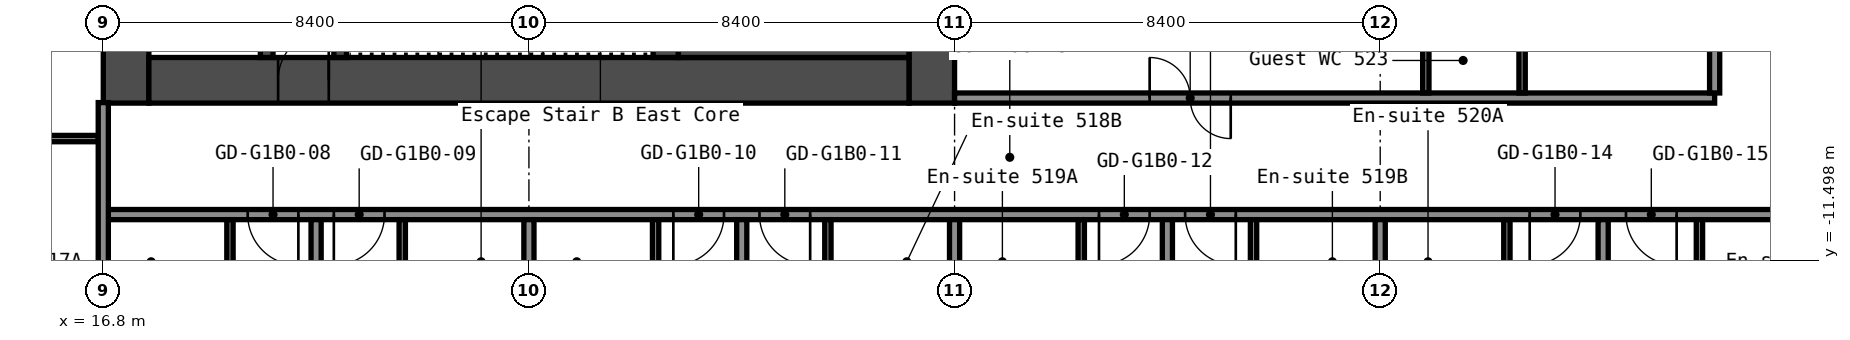
"""IFC4 building model, lengths in metres.
Left out: names, types, materials, properties, quantities, classifications, styles, units other than length and angle.
Written with IfcOpenShell. Run it as: python <this file> out.ifc"""

import sys

from ifc_helpers import new_model, si_unit, direction, frame, frame_2d, origin, place, context, subcontext, project, spatial, rectangle, extrude, element, fill, save


model = new_model("IFC4")
c1 = context("Model", 3, precision=1e-05, world=origin(), true_north=direction((0.0, 1.0)))
c2 = subcontext(c1, "Body", "Model", "MODEL_VIEW")
j1 = project(units=[si_unit("LENGTHUNIT", "METRE"), si_unit("PLANEANGLEUNIT", "RADIAN")], contexts=[c1])
p1 = place(None, origin())
s1 = spatial("IfcSite", under=j1, at=p1, CompositionType="ELEMENT")
p2 = place(p1, origin())
s2 = spatial("IfcBuilding", under=s1, at=p2, CompositionType="ELEMENT")
p3 = place(p2, frame((0.0, 0.0, 23.0)))
s3 = spatial("IfcBuildingStorey", under=s2, at=p3, CompositionType="ELEMENT", Elevation=23.0)
p4 = place(p3, frame((17.25, -8.4, 0.0), z_axis=(0.0, 0.0, 1.0), x_axis=(0.0, 1.0, 0.0)))
e1 = element("IfcWall", 1, at=p4, inside=s3, PredefinedType="SHEAR", context=c2, shape_type="SweptSolid", body=[
    extrude(rectangle(XDim=16.8, YDim=0.9, at=frame_2d((8.4, 0.0))), origin(), (0.0, 0.0, 1.0), 2.8),
])
p5 = place(p4, frame((12.75, 0.0, 0.0)))
e2 = element("IfcOpeningElement", 2, at=p5, cuts=e1, PredefinedType="OPENING", context=c2, shape_type="SweptSolid", body=[
    extrude(rectangle(XDim=1.2, YDim=2.1, at=frame_2d((0.6, 1.05))), frame((0.0, 0.46, 0.0), z_axis=(0.0, -1.0, 0.0), x_axis=(1.0, 0.0, 0.0)), (0.0, 0.0, 1.0), 0.92),
])
p6 = place(p4, frame((2.85, 0.0, 0.0)))
e3 = element("IfcOpeningElement", 3, at=p6, cuts=e1, PredefinedType="OPENING", context=c2, shape_type="SweptSolid", body=[
    extrude(rectangle(XDim=1.2, YDim=2.1, at=frame_2d((0.6, 1.05))), frame((0.0, 0.46, 0.0), z_axis=(0.0, -1.0, 0.0), x_axis=(1.0, 0.0, 0.0)), (0.0, 0.0, 1.0), 0.92),
])
p7 = place(p3, frame((33.15, -8.4, 0.0), z_axis=(0.0, 0.0, 1.0), x_axis=(0.0, 1.0, 0.0)))
e4 = element("IfcWall", 4, at=p7, inside=s3, PredefinedType="SHEAR", context=c2, shape_type="SweptSolid", body=[
    extrude(rectangle(XDim=16.8, YDim=0.9, at=frame_2d((8.4, 0.0))), origin(), (0.0, 0.0, 1.0), 2.8),
])
p8 = place(p3, frame((17.7, -7.95, 0.0), z_axis=(0.0, 0.0, 1.0), x_axis=(1.0, 0.0, 0.0)))
e5 = element("IfcWall", 5, at=p8, inside=s3, PredefinedType="SHEAR", context=c2, shape_type="SweptSolid", body=[
    extrude(rectangle(XDim=15.0, YDim=0.9, at=frame_2d((7.5, 0.0))), origin(), (0.0, 0.0, 1.0), 2.8),
])
p9 = place(p8, frame((2.55, 0.0, 0.0)))
e6 = element("IfcOpeningElement", 6, at=p9, cuts=e5, PredefinedType="OPENING", context=c2, shape_type="SweptSolid", body=[
    extrude(rectangle(XDim=1.0, YDim=2.1, at=frame_2d((0.5, 1.05))), frame((0.0, 0.46, 0.0), z_axis=(0.0, -1.0, 0.0), x_axis=(1.0, 0.0, 0.0)), (0.0, 0.0, 1.0), 0.92),
])
p10 = place(p3, frame((20.025, -7.5, 0.0), z_axis=(0.0, 0.0, 1.0), x_axis=(0.0, 1.0, 0.0)))
e7 = element("IfcWall", 7, at=p10, inside=s3, PredefinedType="SHEAR", context=c2, shape_type="SweptSolid", body=[
    extrude(rectangle(XDim=6.3, YDim=0.25, at=frame_2d((3.15, 0.0))), origin(), (0.0, 0.0, 1.0), 2.8),
])
p11 = place(p10, frame((2.4, 0.0, 0.0)))
e8 = element("IfcOpeningElement", 8, at=p11, cuts=e7, PredefinedType="OPENING", context=c2, shape_type="SweptSolid", body=[
    extrude(rectangle(XDim=1.0, YDim=2.1, at=frame_2d((0.5, 1.05))), frame((0.0, 0.135, 0.0), z_axis=(0.0, -1.0, 0.0), x_axis=(1.0, 0.0, 0.0)), (0.0, 0.0, 1.0), 0.27),
])
p12 = place(p3, frame((21.475, -7.5, 0.0), z_axis=(0.0, 0.0, 1.0), x_axis=(0.0, 1.0, 0.0)))
e9 = element("IfcWall", 9, at=p12, inside=s3, PredefinedType="SHEAR", context=c2, shape_type="SweptSolid", body=[
    extrude(rectangle(XDim=3.75, YDim=0.25, at=frame_2d((1.875, 0.0))), origin(), (0.0, 0.0, 1.0), 2.8),
])
p13 = place(p12, frame((1.3, 0.0, 0.0)))
e10 = element("IfcOpeningElement", 10, at=p13, cuts=e9, PredefinedType="OPENING", context=c2, shape_type="SweptSolid", body=[
    extrude(rectangle(XDim=1.2, YDim=2.1, at=frame_2d((0.6, 1.05))), frame((0.0, 0.135, 0.0), z_axis=(0.0, -1.0, 0.0), x_axis=(1.0, 0.0, 0.0)), (0.0, 0.0, 1.0), 0.27),
])
p14 = place(p3, frame((27.9, -7.5, 0.0), z_axis=(0.0, 0.0, 1.0), x_axis=(0.0, 1.0, 0.0)))
e11 = element("IfcWall", 11, at=p14, inside=s3, PredefinedType="SHEAR", context=c2, shape_type="SweptSolid", body=[
    extrude(rectangle(XDim=3.75, YDim=0.5, at=frame_2d((1.875, 0.0))), origin(), (0.0, 0.0, 1.0), 2.8),
])
p15 = place(p3, frame((28.15, -6.75, 0.0), z_axis=(0.0, 0.0, 1.0), x_axis=(1.0, 0.0, 0.0)))
e12 = element("IfcWall", 12, at=p15, inside=s3, PredefinedType="SHEAR", context=c2, shape_type="SweptSolid", body=[
    extrude(rectangle(XDim=4.55, YDim=1.5, at=frame_2d((2.275, 0.0))), origin(), (0.0, 0.0, 1.0), 2.8),
])
p16 = place(p3, frame((16.8, -10.6, 0.0), z_axis=(0.0, 0.0, 1.0), x_axis=(1.0, 0.0, 0.0)))
e13 = element("IfcWall", 13, at=p16, inside=s3, PredefinedType="PARTITIONING", context=c2, shape_type="SweptSolid", body=[
    extrude(rectangle(XDim=34.3, YDim=0.2, at=frame_2d((17.15, 0.0))), origin(), (0.0, 0.0, 1.0), 2.8),
])
p17 = place(p16, frame((2.85, 0.0, 0.0)))
e14 = element("IfcOpeningElement", 14, at=p17, cuts=e13, PredefinedType="OPENING", context=c2, shape_type="SweptSolid", body=[
    extrude(rectangle(XDim=1.0, YDim=2.1, at=frame_2d((0.5, 1.05))), frame((0.0, 0.11, 0.0), z_axis=(0.0, -1.0, 0.0), x_axis=(1.0, 0.0, 0.0)), (0.0, 0.0, 1.0), 0.22),
])
p18 = place(p16, frame((4.55, 0.0, 0.0)))
e15 = element("IfcOpeningElement", 15, at=p18, cuts=e13, PredefinedType="OPENING", context=c2, shape_type="SweptSolid", body=[
    extrude(rectangle(XDim=1.0, YDim=2.1, at=frame_2d((0.5, 1.05))), frame((0.0, 0.11, 0.0), z_axis=(0.0, -1.0, 0.0), x_axis=(1.0, 0.0, 0.0)), (0.0, 0.0, 1.0), 0.22),
])
p19 = place(p16, frame((11.25, 0.0, 0.0)))
e16 = element("IfcOpeningElement", 16, at=p19, cuts=e13, PredefinedType="OPENING", context=c2, shape_type="SweptSolid", body=[
    extrude(rectangle(XDim=1.0, YDim=2.1, at=frame_2d((0.5, 1.05))), frame((0.0, 0.11, 0.0), z_axis=(0.0, -1.0, 0.0), x_axis=(1.0, 0.0, 0.0)), (0.0, 0.0, 1.0), 0.22),
])
p20 = place(p16, frame((12.95, 0.0, 0.0)))
e17 = element("IfcOpeningElement", 17, at=p20, cuts=e13, PredefinedType="OPENING", context=c2, shape_type="SweptSolid", body=[
    extrude(rectangle(XDim=1.0, YDim=2.1, at=frame_2d((0.5, 1.05))), frame((0.0, 0.11, 0.0), z_axis=(0.0, -1.0, 0.0), x_axis=(1.0, 0.0, 0.0)), (0.0, 0.0, 1.0), 0.22),
])
p21 = place(p16, frame((19.65, 0.0, 0.0)))
e18 = element("IfcOpeningElement", 18, at=p21, cuts=e13, PredefinedType="OPENING", context=c2, shape_type="SweptSolid", body=[
    extrude(rectangle(XDim=1.0, YDim=2.1, at=frame_2d((0.5, 1.05))), frame((0.0, 0.11, 0.0), z_axis=(0.0, -1.0, 0.0), x_axis=(1.0, 0.0, 0.0)), (0.0, 0.0, 1.0), 0.22),
])
p22 = place(p16, frame((21.35, 0.0, 0.0)))
e19 = element("IfcOpeningElement", 19, at=p22, cuts=e13, PredefinedType="OPENING", context=c2, shape_type="SweptSolid", body=[
    extrude(rectangle(XDim=1.0, YDim=2.1, at=frame_2d((0.5, 1.05))), frame((0.0, 0.11, 0.0), z_axis=(0.0, -1.0, 0.0), x_axis=(1.0, 0.0, 0.0)), (0.0, 0.0, 1.0), 0.22),
])
p23 = place(p16, frame((28.15, 0.0, 0.0)))
e20 = element("IfcOpeningElement", 20, at=p23, cuts=e13, PredefinedType="OPENING", context=c2, shape_type="SweptSolid", body=[
    extrude(rectangle(XDim=1.0, YDim=2.1, at=frame_2d((0.5, 1.05))), frame((0.0, 0.11, 0.0), z_axis=(0.0, -1.0, 0.0), x_axis=(1.0, 0.0, 0.0)), (0.0, 0.0, 1.0), 0.22),
])
p24 = place(p16, frame((30.05, 0.0, 0.0)))
e21 = element("IfcOpeningElement", 21, at=p24, cuts=e13, PredefinedType="OPENING", context=c2, shape_type="SweptSolid", body=[
    extrude(rectangle(XDim=1.0, YDim=2.1, at=frame_2d((0.5, 1.05))), frame((0.0, 0.11, 0.0), z_axis=(0.0, -1.0, 0.0), x_axis=(1.0, 0.0, 0.0)), (0.0, 0.0, 1.0), 0.22),
])
p25 = place(p3, frame((14.363, -9.1, 0.0), z_axis=(0.0, 0.0, 1.0), x_axis=(1.0, 0.0, 0.0)))
e22 = element("IfcWall", 22, at=p25, inside=s3, PredefinedType="PARTITIONING", context=c2, shape_type="SweptSolid", body=[
    extrude(rectangle(XDim=2.337, YDim=0.125, at=frame_2d((1.169, 0.0))), origin(), (0.0, 0.0, 1.0), 2.8),
])
p26 = place(p3, frame((33.6, -8.3, 0.0), z_axis=(0.0, 0.0, 1.0), x_axis=(1.0, 0.0, 0.0)))
e23 = element("IfcWall", 23, at=p26, inside=s3, PredefinedType="PARTITIONING", context=c2, shape_type="SweptSolid", body=[
    extrude(rectangle(XDim=15.0, YDim=0.2, at=frame_2d((7.5, 0.0))), origin(), (0.0, 0.0, 1.0), 2.8),
])
p27 = place(p26, frame((3.85, 0.0, 0.0)))
e24 = element("IfcOpeningElement", 24, at=p27, cuts=e23, PredefinedType="OPENING", context=c2, shape_type="SweptSolid", body=[
    extrude(rectangle(XDim=1.6, YDim=2.1, at=frame_2d((0.8, 1.05))), frame((0.0, 0.11, 0.0), z_axis=(0.0, -1.0, 0.0), x_axis=(1.0, 0.0, 0.0)), (0.0, 0.0, 1.0), 0.22),
])
p28 = place(p3, frame((16.8, -20.3, 0.0), z_axis=(0.0, 0.0, 1.0), x_axis=(0.0, 1.0, 0.0)))
e25 = element("IfcWall", 25, at=p28, inside=s3, PredefinedType="PARTITIONING", context=c2, shape_type="SweptSolid", body=[
    extrude(rectangle(XDim=11.91, YDim=0.2, at=frame_2d((5.955, 0.0))), origin(), (0.0, 0.0, 1.0), 2.8),
])
p29 = place(p3, frame((19.3, -13.6, 0.0), z_axis=(0.0, 0.0, 1.0), x_axis=(0.0, 1.0, 0.0)))
e26 = element("IfcWall", 26, at=p29, inside=s3, PredefinedType="PARTITIONING", context=c2, shape_type="SweptSolid", body=[
    extrude(rectangle(XDim=2.9, YDim=0.125, at=frame_2d((1.45, 0.0))), origin(), (0.0, 0.0, 1.0), 2.8),
])
p30 = place(p29, frame((0.6, 0.0, 0.0)))
e27 = element("IfcOpeningElement", 27, at=p30, cuts=e26, PredefinedType="OPENING", context=c2, shape_type="SweptSolid", body=[
    extrude(rectangle(XDim=0.8, YDim=2.1, at=frame_2d((0.4, 1.05))), frame((0.0, 0.073, 0.0), z_axis=(0.0, -1.0, 0.0), x_axis=(1.0, 0.0, 0.0)), (0.0, 0.0, 1.0), 0.145),
])
p31 = place(p3, frame((21.0, -20.3, 0.0), z_axis=(0.0, 0.0, 1.0), x_axis=(0.0, 1.0, 0.0)))
e28 = element("IfcWall", 28, at=p31, inside=s3, PredefinedType="PARTITIONING", context=c2, shape_type="SweptSolid", body=[
    extrude(rectangle(XDim=9.6, YDim=0.2, at=frame_2d((4.8, 0.0))), origin(), (0.0, 0.0, 1.0), 2.8),
])
p32 = place(p3, frame((22.7, -13.6, 0.0), z_axis=(0.0, 0.0, 1.0), x_axis=(0.0, 1.0, 0.0)))
e29 = element("IfcWall", 29, at=p32, inside=s3, PredefinedType="PARTITIONING", context=c2, shape_type="SweptSolid", body=[
    extrude(rectangle(XDim=2.9, YDim=0.125, at=frame_2d((1.45, 0.0))), origin(), (0.0, 0.0, 1.0), 2.8),
])
p33 = place(p32, frame((0.6, 0.0, 0.0)))
e30 = element("IfcOpeningElement", 30, at=p33, cuts=e29, PredefinedType="OPENING", context=c2, shape_type="SweptSolid", body=[
    extrude(rectangle(XDim=0.8, YDim=2.1, at=frame_2d((0.4, 1.05))), frame((0.0, 0.073, 0.0), z_axis=(0.0, -1.0, 0.0), x_axis=(1.0, 0.0, 0.0)), (0.0, 0.0, 1.0), 0.145),
])
p34 = place(p3, frame((25.2, -20.3, 0.0), z_axis=(0.0, 0.0, 1.0), x_axis=(0.0, 1.0, 0.0)))
e31 = element("IfcWall", 31, at=p34, inside=s3, PredefinedType="PARTITIONING", context=c2, shape_type="SweptSolid", body=[
    extrude(rectangle(XDim=9.6, YDim=0.2, at=frame_2d((4.8, 0.0))), origin(), (0.0, 0.0, 1.0), 2.8),
])
p35 = place(p3, frame((27.7, -13.6, 0.0), z_axis=(0.0, 0.0, 1.0), x_axis=(0.0, 1.0, 0.0)))
e32 = element("IfcWall", 32, at=p35, inside=s3, PredefinedType="PARTITIONING", context=c2, shape_type="SweptSolid", body=[
    extrude(rectangle(XDim=2.9, YDim=0.125, at=frame_2d((1.45, 0.0))), origin(), (0.0, 0.0, 1.0), 2.8),
])
p36 = place(p35, frame((0.6, 0.0, 0.0)))
e33 = element("IfcOpeningElement", 33, at=p36, cuts=e32, PredefinedType="OPENING", context=c2, shape_type="SweptSolid", body=[
    extrude(rectangle(XDim=0.8, YDim=2.1, at=frame_2d((0.4, 1.05))), frame((0.0, 0.073, 0.0), z_axis=(0.0, -1.0, 0.0), x_axis=(1.0, 0.0, 0.0)), (0.0, 0.0, 1.0), 0.145),
])
p37 = place(p3, frame((29.4, -20.3, 0.0), z_axis=(0.0, 0.0, 1.0), x_axis=(0.0, 1.0, 0.0)))
e34 = element("IfcWall", 34, at=p37, inside=s3, PredefinedType="PARTITIONING", context=c2, shape_type="SweptSolid", body=[
    extrude(rectangle(XDim=9.6, YDim=0.2, at=frame_2d((4.8, 0.0))), origin(), (0.0, 0.0, 1.0), 2.8),
])
p38 = place(p3, frame((31.1, -13.6, 0.0), z_axis=(0.0, 0.0, 1.0), x_axis=(0.0, 1.0, 0.0)))
e35 = element("IfcWall", 35, at=p38, inside=s3, PredefinedType="PARTITIONING", context=c2, shape_type="SweptSolid", body=[
    extrude(rectangle(XDim=2.9, YDim=0.125, at=frame_2d((1.45, 0.0))), origin(), (0.0, 0.0, 1.0), 2.8),
])
p39 = place(p38, frame((0.6, 0.0, 0.0)))
e36 = element("IfcOpeningElement", 36, at=p39, cuts=e35, PredefinedType="OPENING", context=c2, shape_type="SweptSolid", body=[
    extrude(rectangle(XDim=0.8, YDim=2.1, at=frame_2d((0.4, 1.05))), frame((0.0, 0.073, 0.0), z_axis=(0.0, -1.0, 0.0), x_axis=(1.0, 0.0, 0.0)), (0.0, 0.0, 1.0), 0.145),
])
p40 = place(p3, frame((33.6, -20.3, 0.0), z_axis=(0.0, 0.0, 1.0), x_axis=(0.0, 1.0, 0.0)))
e37 = element("IfcWall", 37, at=p40, inside=s3, PredefinedType="PARTITIONING", context=c2, shape_type="SweptSolid", body=[
    extrude(rectangle(XDim=9.6, YDim=0.2, at=frame_2d((4.8, 0.0))), origin(), (0.0, 0.0, 1.0), 2.8),
])
p41 = place(p3, frame((36.1, -13.6, 0.0), z_axis=(0.0, 0.0, 1.0), x_axis=(0.0, 1.0, 0.0)))
e38 = element("IfcWall", 38, at=p41, inside=s3, PredefinedType="PARTITIONING", context=c2, shape_type="SweptSolid", body=[
    extrude(rectangle(XDim=2.9, YDim=0.125, at=frame_2d((1.45, 0.0))), origin(), (0.0, 0.0, 1.0), 2.8),
])
p42 = place(p41, frame((0.6, 0.0, 0.0)))
e39 = element("IfcOpeningElement", 39, at=p42, cuts=e38, PredefinedType="OPENING", context=c2, shape_type="SweptSolid", body=[
    extrude(rectangle(XDim=0.8, YDim=2.1, at=frame_2d((0.4, 1.05))), frame((0.0, 0.073, 0.0), z_axis=(0.0, -1.0, 0.0), x_axis=(1.0, 0.0, 0.0)), (0.0, 0.0, 1.0), 0.145),
])
p43 = place(p3, frame((37.8, -20.3, 0.0), z_axis=(0.0, 0.0, 1.0), x_axis=(0.0, 1.0, 0.0)))
e40 = element("IfcWall", 40, at=p43, inside=s3, PredefinedType="PARTITIONING", context=c2, shape_type="SweptSolid", body=[
    extrude(rectangle(XDim=9.6, YDim=0.2, at=frame_2d((4.8, 0.0))), origin(), (0.0, 0.0, 1.0), 2.8),
])
p44 = place(p3, frame((39.5, -13.6, 0.0), z_axis=(0.0, 0.0, 1.0), x_axis=(0.0, 1.0, 0.0)))
e41 = element("IfcWall", 41, at=p44, inside=s3, PredefinedType="PARTITIONING", context=c2, shape_type="SweptSolid", body=[
    extrude(rectangle(XDim=2.9, YDim=0.125, at=frame_2d((1.45, 0.0))), origin(), (0.0, 0.0, 1.0), 2.8),
])
p45 = place(p44, frame((0.6, 0.0, 0.0)))
e42 = element("IfcOpeningElement", 42, at=p45, cuts=e41, PredefinedType="OPENING", context=c2, shape_type="SweptSolid", body=[
    extrude(rectangle(XDim=0.8, YDim=2.1, at=frame_2d((0.4, 1.05))), frame((0.0, 0.073, 0.0), z_axis=(0.0, -1.0, 0.0), x_axis=(1.0, 0.0, 0.0)), (0.0, 0.0, 1.0), 0.145),
])
p46 = place(p3, frame((42.0, -20.3, 0.0), z_axis=(0.0, 0.0, 1.0), x_axis=(0.0, 1.0, 0.0)))
e43 = element("IfcWall", 43, at=p46, inside=s3, PredefinedType="PARTITIONING", context=c2, shape_type="SweptSolid", body=[
    extrude(rectangle(XDim=9.6, YDim=0.2, at=frame_2d((4.8, 0.0))), origin(), (0.0, 0.0, 1.0), 2.8),
])
p47 = place(p3, frame((42.9, -8.2, 0.0), z_axis=(0.0, 0.0, 1.0), x_axis=(0.0, 1.0, 0.0)))
e44 = element("IfcWall", 44, at=p47, inside=s3, PredefinedType="PARTITIONING", context=c2, shape_type="SweptSolid", body=[
    extrude(rectangle(XDim=2.3, YDim=0.125, at=frame_2d((1.15, 0.0))), origin(), (0.0, 0.0, 1.0), 2.8),
])
p48 = place(p3, frame((44.5, -13.6, 0.0), z_axis=(0.0, 0.0, 1.0), x_axis=(0.0, 1.0, 0.0)))
e45 = element("IfcWall", 45, at=p48, inside=s3, PredefinedType="PARTITIONING", context=c2, shape_type="SweptSolid", body=[
    extrude(rectangle(XDim=2.9, YDim=0.125, at=frame_2d((1.45, 0.0))), origin(), (0.0, 0.0, 1.0), 2.8),
])
p49 = place(p48, frame((0.6, 0.0, 0.0)))
e46 = element("IfcOpeningElement", 46, at=p49, cuts=e45, PredefinedType="OPENING", context=c2, shape_type="SweptSolid", body=[
    extrude(rectangle(XDim=0.8, YDim=2.1, at=frame_2d((0.4, 1.05))), frame((0.0, 0.073, 0.0), z_axis=(0.0, -1.0, 0.0), x_axis=(1.0, 0.0, 0.0)), (0.0, 0.0, 1.0), 0.145),
])
p50 = place(p3, frame((44.8, -8.2, 0.0), z_axis=(0.0, 0.0, 1.0), x_axis=(0.0, 1.0, 0.0)))
e47 = element("IfcWall", 47, at=p50, inside=s3, PredefinedType="PARTITIONING", context=c2, shape_type="SweptSolid", body=[
    extrude(rectangle(XDim=3.3, YDim=0.125, at=frame_2d((1.65, 0.0))), origin(), (0.0, 0.0, 1.0), 2.8),
])
p51 = place(p3, frame((46.4, -20.3, 0.0), z_axis=(0.0, 0.0, 1.0), x_axis=(0.0, 1.0, 0.0)))
e48 = element("IfcWall", 48, at=p51, inside=s3, PredefinedType="PARTITIONING", context=c2, shape_type="SweptSolid", body=[
    extrude(rectangle(XDim=9.6, YDim=0.2, at=frame_2d((4.8, 0.0))), origin(), (0.0, 0.0, 1.0), 2.8),
])
p52 = place(p3, frame((48.3, -13.6, 0.0), z_axis=(0.0, 0.0, 1.0), x_axis=(0.0, 1.0, 0.0)))
e49 = element("IfcWall", 49, at=p52, inside=s3, PredefinedType="PARTITIONING", context=c2, shape_type="SweptSolid", body=[
    extrude(rectangle(XDim=2.9, YDim=0.125, at=frame_2d((1.45, 0.0))), origin(), (0.0, 0.0, 1.0), 2.8),
])
p53 = place(p52, frame((0.6, 0.0, 0.0)))
e50 = element("IfcOpeningElement", 50, at=p53, cuts=e49, PredefinedType="OPENING", context=c2, shape_type="SweptSolid", body=[
    extrude(rectangle(XDim=0.8, YDim=2.1, at=frame_2d((0.4, 1.05))), frame((0.0, 0.073, 0.0), z_axis=(0.0, -1.0, 0.0), x_axis=(1.0, 0.0, 0.0)), (0.0, 0.0, 1.0), 0.145),
])
p54 = place(p3, frame((48.6, -8.2, 0.0), z_axis=(0.0, 0.0, 1.0), x_axis=(0.0, 1.0, 0.0)))
e51 = element("IfcWall", 51, at=p54, inside=s3, PredefinedType="PARTITIONING", context=c2, shape_type="SweptSolid", body=[
    extrude(rectangle(XDim=16.4, YDim=0.2, at=frame_2d((8.2, 0.0))), origin(), (0.0, 0.0, 1.0), 2.8),
])
p55 = place(p9, origin())
e52 = element("IfcDoor", 52, at=p55, inside=s3, OperationType="SINGLE_SWING_LEFT", PredefinedType="DOOR", context=c2, shape_type="SweptSolid", body=[
    extrude(rectangle(XDim=1.0, YDim=2.1, at=frame_2d((0.5, 1.05))), frame((0.0, 0.025, 0.0), z_axis=(0.0, -1.0, 0.0), x_axis=(1.0, 0.0, 0.0)), (0.0, 0.0, 1.0), 0.05),
])
fill(e6, e52)
p56 = place(p17, origin())
e53 = element("IfcDoor", 53, at=p56, inside=s3, OperationType="SINGLE_SWING_RIGHT", PredefinedType="DOOR", context=c2, shape_type="SweptSolid", body=[
    extrude(rectangle(XDim=1.0, YDim=2.1, at=frame_2d((0.5, 1.05))), frame((0.0, 0.025, 0.0), z_axis=(0.0, -1.0, 0.0), x_axis=(1.0, 0.0, 0.0)), (0.0, 0.0, 1.0), 0.05),
])
fill(e14, e53)
p57 = place(p18, origin())
e54 = element("IfcDoor", 54, at=p57, inside=s3, OperationType="SINGLE_SWING_LEFT", PredefinedType="DOOR", context=c2, shape_type="SweptSolid", body=[
    extrude(rectangle(XDim=1.0, YDim=2.1, at=frame_2d((0.5, 1.05))), frame((0.0, 0.025, 0.0), z_axis=(0.0, -1.0, 0.0), x_axis=(1.0, 0.0, 0.0)), (0.0, 0.0, 1.0), 0.05),
])
fill(e15, e54)
p58 = place(p19, origin())
e55 = element("IfcDoor", 55, at=p58, inside=s3, OperationType="SINGLE_SWING_LEFT", PredefinedType="DOOR", context=c2, shape_type="SweptSolid", body=[
    extrude(rectangle(XDim=1.0, YDim=2.1, at=frame_2d((0.5, 1.05))), frame((0.0, 0.025, 0.0), z_axis=(0.0, -1.0, 0.0), x_axis=(1.0, 0.0, 0.0)), (0.0, 0.0, 1.0), 0.05),
])
fill(e16, e55)
p59 = place(p20, origin())
e56 = element("IfcDoor", 56, at=p59, inside=s3, OperationType="SINGLE_SWING_RIGHT", PredefinedType="DOOR", context=c2, shape_type="SweptSolid", body=[
    extrude(rectangle(XDim=1.0, YDim=2.1, at=frame_2d((0.5, 1.05))), frame((0.0, 0.025, 0.0), z_axis=(0.0, -1.0, 0.0), x_axis=(1.0, 0.0, 0.0)), (0.0, 0.0, 1.0), 0.05),
])
fill(e17, e56)
p60 = place(p21, origin())
e57 = element("IfcDoor", 57, at=p60, inside=s3, OperationType="SINGLE_SWING_LEFT", PredefinedType="DOOR", context=c2, shape_type="SweptSolid", body=[
    extrude(rectangle(XDim=1.0, YDim=2.1, at=frame_2d((0.5, 1.05))), frame((0.0, 0.025, 0.0), z_axis=(0.0, -1.0, 0.0), x_axis=(1.0, 0.0, 0.0)), (0.0, 0.0, 1.0), 0.05),
])
fill(e18, e57)
p61 = place(p22, origin())
e58 = element("IfcDoor", 58, at=p61, inside=s3, OperationType="SINGLE_SWING_RIGHT", PredefinedType="DOOR", context=c2, shape_type="SweptSolid", body=[
    extrude(rectangle(XDim=1.0, YDim=2.1, at=frame_2d((0.5, 1.05))), frame((0.0, 0.025, 0.0), z_axis=(0.0, -1.0, 0.0), x_axis=(1.0, 0.0, 0.0)), (0.0, 0.0, 1.0), 0.05),
])
fill(e19, e58)
p62 = place(p23, origin())
e59 = element("IfcDoor", 59, at=p62, inside=s3, OperationType="SINGLE_SWING_LEFT", PredefinedType="DOOR", context=c2, shape_type="SweptSolid", body=[
    extrude(rectangle(XDim=1.0, YDim=2.1, at=frame_2d((0.5, 1.05))), frame((0.0, 0.025, 0.0), z_axis=(0.0, -1.0, 0.0), x_axis=(1.0, 0.0, 0.0)), (0.0, 0.0, 1.0), 0.05),
])
fill(e20, e59)
p63 = place(p24, origin())
e60 = element("IfcDoor", 60, at=p63, inside=s3, OperationType="SINGLE_SWING_RIGHT", PredefinedType="DOOR", context=c2, shape_type="SweptSolid", body=[
    extrude(rectangle(XDim=1.0, YDim=2.1, at=frame_2d((0.5, 1.05))), frame((0.0, 0.025, 0.0), z_axis=(0.0, -1.0, 0.0), x_axis=(1.0, 0.0, 0.0)), (0.0, 0.0, 1.0), 0.05),
])
fill(e21, e60)
p64 = place(p27, origin())
e61 = element("IfcDoor", 61, at=p64, inside=s3, OperationType="DOUBLE_DOOR_SINGLE_SWING", PredefinedType="DOOR", context=c2, shape_type="SweptSolid", body=[
    extrude(rectangle(XDim=1.6, YDim=2.1, at=frame_2d((0.8, 1.05))), frame((0.0, 0.025, 0.0), z_axis=(0.0, -1.0, 0.0), x_axis=(1.0, 0.0, 0.0)), (0.0, 0.0, 1.0), 0.05),
])
fill(e24, e61)
save(model, sys.argv[1])
